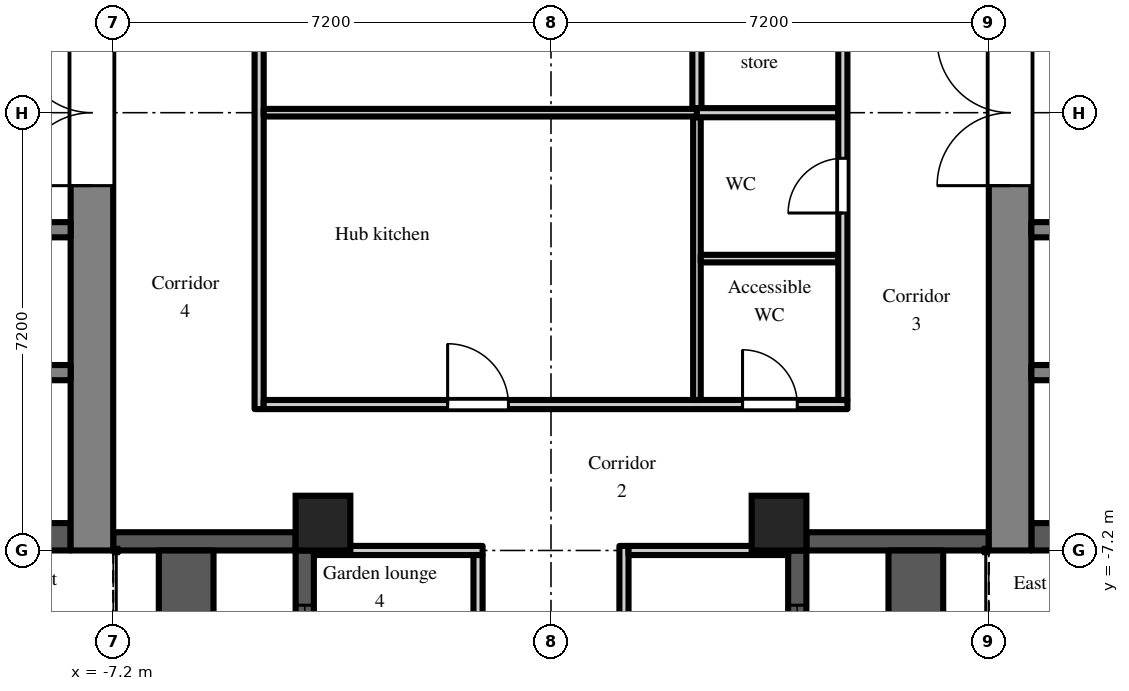
"""IFC4 building model, lengths in metres.
Left out: names, types, materials, properties, quantities, classifications, styles, units other than length and angle.
Written with IfcOpenShell. Run it as: python <this file> out.ifc"""

import sys

from ifc_helpers import new_model, si_unit, direction, frame, frame_2d, origin, origin_2d, place, context, subcontext, project, spatial, rectangle, extrude, element, fill, save


model = new_model("IFC4")
c1 = context("Model", 3, precision=1e-05, world=origin(), true_north=direction((0.0, 1.0)))
c2 = subcontext(c1, "Body", "Model", "MODEL_VIEW")
j1 = project(units=[si_unit("LENGTHUNIT", "METRE"), si_unit("PLANEANGLEUNIT", "RADIAN")], contexts=[c1])
p1 = place(None, origin())
s1 = spatial("IfcSite", under=j1, at=p1, CompositionType="ELEMENT")
p2 = place(p1, origin())
s2 = spatial("IfcBuilding", under=s1, at=p2, CompositionType="ELEMENT")
p3 = place(p2, frame((0.0, 0.0, 129.3)))
s3 = spatial("IfcBuildingStorey", under=s2, at=p3, CompositionType="ELEMENT", Elevation=129.3)
for number, where, z_axis, x_axis in (
    (1, (-3.75, -6.75, 0.0), (0.0, 0.0, 1.0), (1.0, 0.0, 0.0)),
    (2, (3.75, -6.75, 0.0), (0.0, 0.0, 1.0), (1.0, 0.0, 0.0)),
):
    element("IfcColumn", number, at=place(p3, frame(where, z_axis=z_axis, x_axis=x_axis)), inside=s3, PredefinedType="COLUMN", context=c2, shape_type="SweptSolid", body=[
        extrude(rectangle(XDim=0.9, YDim=0.9, at=origin_2d()), origin(), (0.0, 0.0, 1.0), 3.0),
    ])
p4 = place(p3, frame((-7.2, -7.05, 0.0), z_axis=(0.0, 0.0, 1.0), x_axis=(1.0, 0.0, 0.0)))
e3 = element("IfcWall", 3, at=p4, inside=s3, PredefinedType="SOLIDWALL", context=c2, shape_type="SweptSolid", body=[
    extrude(rectangle(XDim=3.0, YDim=0.3, at=frame_2d((1.5, 0.0))), origin(), (0.0, 0.0, 1.0), 2.2),
])
p5 = place(p3, frame((-4.05, -7.2, 0.0), z_axis=(0.0, 0.0, 1.0), x_axis=(0.0, -1.0, 0.0)))
e4 = element("IfcWall", 4, at=p5, inside=s3, PredefinedType="SOLIDWALL", context=c2, shape_type="SweptSolid", body=[
    extrude(rectangle(XDim=7.2, YDim=0.3, at=frame_2d((3.6, 0.0))), origin(), (0.0, 0.0, 1.0), 2.2),
])
p6 = place(p5, frame((3.0, 0.0, 0.0)))
e5 = element("IfcOpeningElement", 5, at=p6, cuts=e4, PredefinedType="OPENING", context=c2, shape_type="SweptSolid", body=[
    extrude(rectangle(XDim=1.2, YDim=2.05, at=frame_2d((0.6, 1.025))), frame((0.0, 0.16, 0.0), z_axis=(0.0, -1.0, 0.0), x_axis=(1.0, 0.0, 0.0)), (0.0, 0.0, 1.0), 0.32),
])
p7 = place(p5, frame((0.9, 0.0, 0.2)))
e6 = element("IfcOpeningElement", 6, at=p7, cuts=e4, PredefinedType="OPENING", context=c2, shape_type="SweptSolid", body=[
    extrude(rectangle(XDim=1.8, YDim=1.85, at=frame_2d((0.9, 0.925))), frame((0.0, 0.16, 0.0), z_axis=(0.0, -1.0, 0.0), x_axis=(1.0, 0.0, 0.0)), (0.0, 0.0, 1.0), 0.32),
])
p8 = place(p5, frame((4.5, 0.0, 0.2)))
e7 = element("IfcOpeningElement", 7, at=p8, cuts=e4, PredefinedType="OPENING", context=c2, shape_type="SweptSolid", body=[
    extrude(rectangle(XDim=1.8, YDim=1.85, at=frame_2d((0.9, 0.925))), frame((0.0, 0.16, 0.0), z_axis=(0.0, -1.0, 0.0), x_axis=(1.0, 0.0, 0.0)), (0.0, 0.0, 1.0), 0.32),
])
p9 = place(p3, frame((4.05, -14.4, 0.0), z_axis=(0.0, 0.0, 1.0), x_axis=(0.0, 1.0, 0.0)))
e8 = element("IfcWall", 8, at=p9, inside=s3, PredefinedType="SOLIDWALL", context=c2, shape_type="SweptSolid", body=[
    extrude(rectangle(XDim=7.2, YDim=0.3, at=frame_2d((3.6, 0.0))), origin(), (0.0, 0.0, 1.0), 2.2),
])
p10 = place(p9, frame((3.0, 0.0, 0.0)))
e9 = element("IfcOpeningElement", 9, at=p10, cuts=e8, PredefinedType="OPENING", context=c2, shape_type="SweptSolid", body=[
    extrude(rectangle(XDim=1.2, YDim=2.05, at=frame_2d((0.6, 1.025))), frame((0.0, 0.16, 0.0), z_axis=(0.0, -1.0, 0.0), x_axis=(1.0, 0.0, 0.0)), (0.0, 0.0, 1.0), 0.32),
])
p11 = place(p9, frame((0.9, 0.0, 0.2)))
e10 = element("IfcOpeningElement", 10, at=p11, cuts=e8, PredefinedType="OPENING", context=c2, shape_type="SweptSolid", body=[
    extrude(rectangle(XDim=1.8, YDim=1.85, at=frame_2d((0.9, 0.925))), frame((0.0, 0.16, 0.0), z_axis=(0.0, -1.0, 0.0), x_axis=(1.0, 0.0, 0.0)), (0.0, 0.0, 1.0), 0.32),
])
p12 = place(p9, frame((4.5, 0.0, 0.2)))
e11 = element("IfcOpeningElement", 11, at=p12, cuts=e8, PredefinedType="OPENING", context=c2, shape_type="SweptSolid", body=[
    extrude(rectangle(XDim=1.8, YDim=1.85, at=frame_2d((0.9, 0.925))), frame((0.0, 0.16, 0.0), z_axis=(0.0, -1.0, 0.0), x_axis=(1.0, 0.0, 0.0)), (0.0, 0.0, 1.0), 0.32),
])
p13 = place(p3, frame((4.2, -7.05, 0.0), z_axis=(0.0, 0.0, 1.0), x_axis=(1.0, 0.0, 0.0)))
e12 = element("IfcWall", 12, at=p13, inside=s3, PredefinedType="SOLIDWALL", context=c2, shape_type="SweptSolid", body=[
    extrude(rectangle(XDim=3.0, YDim=0.3, at=frame_2d((1.5, 0.0))), origin(), (0.0, 0.0, 1.0), 2.2),
])
for number, where, z_axis, x_axis in (
    (13, (6.0, -14.4, 0.0), (0.0, 0.0, 1.0), (0.0, 1.0, 0.0)),
    (14, (-6.0, -14.4, 0.0), (0.0, 0.0, 1.0), (0.0, 1.0, 0.0)),
):
    element("IfcWall", number, at=place(p3, frame(where, z_axis=z_axis, x_axis=x_axis)), inside=s3, PredefinedType="PARAPET", context=c2, shape_type="SweptSolid", body=[
        extrude(rectangle(XDim=7.2, YDim=0.9, at=frame_2d((3.6, 0.0))), origin(), (0.0, 0.0, 1.0), 0.8),
    ])
p14 = place(p3, frame((7.55, -7.2, 0.0), z_axis=(0.0, 0.0, 1.0), x_axis=(0.0, 1.0, 0.0)))
e15 = element("IfcWall", 15, at=p14, inside=s3, PredefinedType="SHEAR", context=c2, shape_type="SweptSolid", body=[
    extrude(rectangle(XDim=14.4, YDim=0.7, at=frame_2d((7.2, 0.0))), origin(), (0.0, 0.0, 1.0), 2.6),
])
p15 = place(p14, frame((6.0, 0.0, 0.0)))
e16 = element("IfcOpeningElement", 16, at=p15, cuts=e15, PredefinedType="OPENING", context=c2, shape_type="SweptSolid", body=[
    extrude(rectangle(XDim=2.4, YDim=2.2, at=frame_2d((1.2, 1.1))), frame((0.0, 0.36, 0.0), z_axis=(0.0, -1.0, 0.0), x_axis=(1.0, 0.0, 0.0)), (0.0, 0.0, 1.0), 0.72),
])
p16 = place(p3, frame((7.9, -6.975, 0.0), z_axis=(0.0, 0.0, 1.0), x_axis=(1.0, 0.0, 0.0)))
e17 = element("IfcWall", 17, at=p16, inside=s3, PredefinedType="SHEAR", context=c2, shape_type="SweptSolid", body=[
    extrude(rectangle(XDim=12.95, YDim=0.45, at=frame_2d((6.475, 0.0))), origin(), (0.0, 0.0, 1.0), 2.6),
])
p17 = place(p3, frame((7.9, -1.925, 0.0), z_axis=(0.0, 0.0, 1.0), x_axis=(1.0, 0.0, 0.0)))
e18 = element("IfcWall", 18, at=p17, inside=s3, PredefinedType="SHEAR", context=c2, shape_type="SweptSolid", body=[
    extrude(rectangle(XDim=12.95, YDim=0.25, at=frame_2d((6.475, 0.0))), origin(), (0.0, 0.0, 1.0), 2.6),
])
p18 = place(p17, frame((0.525, 0.0, 0.0)))
e19 = element("IfcOpeningElement", 19, at=p18, cuts=e18, PredefinedType="OPENING", context=c2, shape_type="SweptSolid", body=[
    extrude(rectangle(XDim=0.9, YDim=2.1, at=frame_2d((0.45, 1.05))), frame((0.0, 0.135, 0.0), z_axis=(0.0, -1.0, 0.0), x_axis=(1.0, 0.0, 0.0)), (0.0, 0.0, 1.0), 0.27),
])
p19 = place(p17, frame((2.625, 0.0, 0.0)))
e20 = element("IfcOpeningElement", 20, at=p19, cuts=e18, PredefinedType="OPENING", context=c2, shape_type="SweptSolid", body=[
    extrude(rectangle(XDim=1.1, YDim=2.1, at=frame_2d((0.55, 1.05))), frame((0.0, 0.135, 0.0), z_axis=(0.0, -1.0, 0.0), x_axis=(1.0, 0.0, 0.0)), (0.0, 0.0, 1.0), 0.27),
])
p20 = place(p17, frame((8.225, 0.0, 0.0)))
e21 = element("IfcOpeningElement", 21, at=p20, cuts=e18, PredefinedType="OPENING", context=c2, shape_type="SweptSolid", body=[
    extrude(rectangle(XDim=0.9, YDim=2.1, at=frame_2d((0.45, 1.05))), frame((0.0, 0.135, 0.0), z_axis=(0.0, -1.0, 0.0), x_axis=(1.0, 0.0, 0.0)), (0.0, 0.0, 1.0), 0.27),
])
p21 = place(p3, frame((7.9, -4.275, 0.0), z_axis=(0.0, 0.0, 1.0), x_axis=(1.0, 0.0, 0.0)))
e22 = element("IfcWall", 22, at=p21, inside=s3, PredefinedType="SHEAR", context=c2, shape_type="SweptSolid", body=[
    extrude(rectangle(XDim=1.95, YDim=0.25, at=frame_2d((0.975, 0.0))), origin(), (0.0, 0.0, 1.0), 2.6),
])
p22 = place(p3, frame((-7.55, -7.2, 0.0), z_axis=(0.0, 0.0, 1.0), x_axis=(0.0, 1.0, 0.0)))
e23 = element("IfcWall", 23, at=p22, inside=s3, PredefinedType="SHEAR", context=c2, shape_type="SweptSolid", body=[
    extrude(rectangle(XDim=14.4, YDim=0.7, at=frame_2d((7.2, 0.0))), origin(), (0.0, 0.0, 1.0), 2.6),
])
p23 = place(p22, frame((6.0, 0.0, 0.0)))
e24 = element("IfcOpeningElement", 24, at=p23, cuts=e23, PredefinedType="OPENING", context=c2, shape_type="SweptSolid", body=[
    extrude(rectangle(XDim=2.4, YDim=2.2, at=frame_2d((1.2, 1.1))), frame((0.0, 0.36, 0.0), z_axis=(0.0, -1.0, 0.0), x_axis=(1.0, 0.0, 0.0)), (0.0, 0.0, 1.0), 0.72),
])
p24 = place(p3, frame((-7.9, -6.975, 0.0), z_axis=(0.0, 0.0, 1.0), x_axis=(-1.0, 0.0, 0.0)))
e25 = element("IfcWall", 25, at=p24, inside=s3, PredefinedType="SHEAR", context=c2, shape_type="SweptSolid", body=[
    extrude(rectangle(XDim=12.95, YDim=0.45, at=frame_2d((6.475, 0.0))), origin(), (0.0, 0.0, 1.0), 2.6),
])
p25 = place(p3, frame((-7.9, -1.925, 0.0), z_axis=(0.0, 0.0, 1.0), x_axis=(-1.0, 0.0, 0.0)))
e26 = element("IfcWall", 26, at=p25, inside=s3, PredefinedType="SHEAR", context=c2, shape_type="SweptSolid", body=[
    extrude(rectangle(XDim=12.95, YDim=0.25, at=frame_2d((6.475, 0.0))), origin(), (0.0, 0.0, 1.0), 2.6),
])
p26 = place(p25, frame((0.525, 0.0, 0.0)))
e27 = element("IfcOpeningElement", 27, at=p26, cuts=e26, PredefinedType="OPENING", context=c2, shape_type="SweptSolid", body=[
    extrude(rectangle(XDim=0.9, YDim=2.1, at=frame_2d((0.45, 1.05))), frame((0.0, 0.135, 0.0), z_axis=(0.0, -1.0, 0.0), x_axis=(1.0, 0.0, 0.0)), (0.0, 0.0, 1.0), 0.27),
])
p27 = place(p25, frame((2.625, 0.0, 0.0)))
e28 = element("IfcOpeningElement", 28, at=p27, cuts=e26, PredefinedType="OPENING", context=c2, shape_type="SweptSolid", body=[
    extrude(rectangle(XDim=1.1, YDim=2.1, at=frame_2d((0.55, 1.05))), frame((0.0, 0.135, 0.0), z_axis=(0.0, -1.0, 0.0), x_axis=(1.0, 0.0, 0.0)), (0.0, 0.0, 1.0), 0.27),
])
p28 = place(p25, frame((8.225, 0.0, 0.0)))
e29 = element("IfcOpeningElement", 29, at=p28, cuts=e26, PredefinedType="OPENING", context=c2, shape_type="SweptSolid", body=[
    extrude(rectangle(XDim=0.9, YDim=2.1, at=frame_2d((0.45, 1.05))), frame((0.0, 0.135, 0.0), z_axis=(0.0, -1.0, 0.0), x_axis=(1.0, 0.0, 0.0)), (0.0, 0.0, 1.0), 0.27),
])
p29 = place(p3, frame((-7.9, -4.275, 0.0), z_axis=(0.0, 0.0, 1.0), x_axis=(-1.0, 0.0, 0.0)))
e30 = element("IfcWall", 30, at=p29, inside=s3, PredefinedType="SHEAR", context=c2, shape_type="SweptSolid", body=[
    extrude(rectangle(XDim=1.95, YDim=0.25, at=frame_2d((0.975, 0.0))), origin(), (0.0, 0.0, 1.0), 2.6),
])
p30 = place(p3, frame((-4.8, -4.875, 0.0), z_axis=(0.0, 0.0, 1.0), x_axis=(0.0, 1.0, 0.0)))
e31 = element("IfcWall", 31, at=p30, inside=s3, PredefinedType="PARTITIONING", context=c2, shape_type="SweptSolid", body=[
    extrude(rectangle(XDim=9.75, YDim=0.15, at=frame_2d((4.875, 0.0))), origin(), (0.0, 0.0, 1.0), 2.6),
])
p31 = place(p3, frame((-4.725, -4.8, 0.0), z_axis=(0.0, 0.0, 1.0), x_axis=(1.0, 0.0, 0.0)))
e32 = element("IfcWall", 32, at=p31, inside=s3, PredefinedType="PARTITIONING", context=c2, shape_type="SweptSolid", body=[
    extrude(rectangle(XDim=9.6, YDim=0.15, at=frame_2d((4.8, 0.0))), origin(), (0.0, 0.0, 1.0), 2.6),
])
p32 = place(p31, frame((7.875, 0.0, 0.0)))
e33 = element("IfcOpeningElement", 33, at=p32, cuts=e32, PredefinedType="OPENING", context=c2, shape_type="SweptSolid", body=[
    extrude(rectangle(XDim=0.9, YDim=2.1, at=frame_2d((0.45, 1.05))), frame((0.0, 0.085, 0.0), z_axis=(0.0, -1.0, 0.0), x_axis=(1.0, 0.0, 0.0)), (0.0, 0.0, 1.0), 0.17),
])
p33 = place(p31, frame((3.025, 0.0, 0.0)))
e34 = element("IfcOpeningElement", 34, at=p33, cuts=e32, PredefinedType="OPENING", context=c2, shape_type="SweptSolid", body=[
    extrude(rectangle(XDim=1.0, YDim=2.1, at=frame_2d((0.5, 1.05))), frame((0.0, 0.085, 0.0), z_axis=(0.0, -1.0, 0.0), x_axis=(1.0, 0.0, 0.0)), (0.0, 0.0, 1.0), 0.17),
])
p34 = place(p3, frame((-4.725, 0.0, 0.0), z_axis=(0.0, 0.0, 1.0), x_axis=(1.0, 0.0, 0.0)))
e35 = element("IfcWall", 35, at=p34, inside=s3, PredefinedType="PARTITIONING", context=c2, shape_type="SweptSolid", body=[
    extrude(rectangle(XDim=7.125, YDim=0.125, at=frame_2d((3.562, 0.0))), origin(), (0.0, 0.0, 1.0), 2.6),
])
p35 = place(p3, frame((-3.9, -7.2, 0.0), z_axis=(0.0, 0.0, 1.0), x_axis=(1.0, 0.0, 0.0)))
e36 = element("IfcWall", 36, at=p35, inside=s3, PredefinedType="PARTITIONING", context=c2, shape_type="SweptSolid", body=[
    extrude(rectangle(XDim=2.775, YDim=0.15, at=frame_2d((1.387, 0.0))), origin(), (0.0, 0.0, 1.0), 2.6),
])
p36 = place(p3, frame((-1.2, -17.925, 0.0), z_axis=(0.0, 0.0, 1.0), x_axis=(0.0, 1.0, 0.0)))
e37 = element("IfcWall", 37, at=p36, inside=s3, PredefinedType="PARTITIONING", context=c2, shape_type="SweptSolid", body=[
    extrude(rectangle(XDim=10.65, YDim=0.15, at=frame_2d((5.325, 0.0))), origin(), (0.0, 0.0, 1.0), 2.6),
])
p37 = place(p36, frame((8.475, 0.0, 0.0)))
e38 = element("IfcOpeningElement", 38, at=p37, cuts=e37, PredefinedType="OPENING", context=c2, shape_type="SweptSolid", body=[
    extrude(rectangle(XDim=0.9, YDim=2.1, at=frame_2d((0.45, 1.05))), frame((0.0, 0.085, 0.0), z_axis=(0.0, -1.0, 0.0), x_axis=(1.0, 0.0, 0.0)), (0.0, 0.0, 1.0), 0.17),
])
p38 = place(p36, frame((2.325, 0.0, 0.0)))
e39 = element("IfcOpeningElement", 39, at=p38, cuts=e37, PredefinedType="OPENING", context=c2, shape_type="SweptSolid", body=[
    extrude(rectangle(XDim=1.0, YDim=2.1, at=frame_2d((0.5, 1.05))), frame((0.0, 0.085, 0.0), z_axis=(0.0, -1.0, 0.0), x_axis=(1.0, 0.0, 0.0)), (0.0, 0.0, 1.0), 0.17),
])
p39 = place(p3, frame((1.2, -17.925, 0.0), z_axis=(0.0, 0.0, 1.0), x_axis=(0.0, 1.0, 0.0)))
e40 = element("IfcWall", 40, at=p39, inside=s3, PredefinedType="PARTITIONING", context=c2, shape_type="SweptSolid", body=[
    extrude(rectangle(XDim=10.8, YDim=0.15, at=frame_2d((5.4, 0.0))), origin(), (0.0, 0.0, 1.0), 2.6),
])
p40 = place(p39, frame((4.875, 0.0, 0.0)))
e41 = element("IfcOpeningElement", 41, at=p40, cuts=e40, PredefinedType="OPENING", context=c2, shape_type="SweptSolid", body=[
    extrude(rectangle(XDim=0.9, YDim=2.1, at=frame_2d((0.45, 1.05))), frame((0.0, 0.085, 0.0), z_axis=(0.0, -1.0, 0.0), x_axis=(1.0, 0.0, 0.0)), (0.0, 0.0, 1.0), 0.17),
])
p41 = place(p39, frame((1.925, 0.0, 0.0)))
e42 = element("IfcOpeningElement", 42, at=p41, cuts=e40, PredefinedType="OPENING", context=c2, shape_type="SweptSolid", body=[
    extrude(rectangle(XDim=1.0, YDim=2.1, at=frame_2d((0.5, 1.05))), frame((0.0, 0.085, 0.0), z_axis=(0.0, -1.0, 0.0), x_axis=(1.0, 0.0, 0.0)), (0.0, 0.0, 1.0), 0.17),
])
p42 = place(p3, frame((1.275, -7.2, 0.0), z_axis=(0.0, 0.0, 1.0), x_axis=(1.0, 0.0, 0.0)))
e43 = element("IfcWall", 43, at=p42, inside=s3, PredefinedType="PARTITIONING", context=c2, shape_type="SweptSolid", body=[
    extrude(rectangle(XDim=2.625, YDim=0.15, at=frame_2d((1.312, 0.0))), origin(), (0.0, 0.0, 1.0), 2.6),
])
p43 = place(p3, frame((2.4, -4.725, 0.0), z_axis=(0.0, 0.0, 1.0), x_axis=(0.0, 1.0, 0.0)))
e44 = element("IfcWall", 44, at=p43, inside=s3, PredefinedType="PARTITIONING", context=c2, shape_type="SweptSolid", body=[
    extrude(rectangle(XDim=4.65, YDim=0.125, at=frame_2d((2.325, 0.0))), origin(), (0.0, 0.0, 1.0), 2.6),
])
p44 = place(p3, frame((2.462, -2.4, 0.0), z_axis=(0.0, 0.0, 1.0), x_axis=(1.0, 0.0, 0.0)))
e45 = element("IfcWall", 45, at=p44, inside=s3, PredefinedType="PARTITIONING", context=c2, shape_type="SweptSolid", body=[
    extrude(rectangle(XDim=2.263, YDim=0.125, at=frame_2d((1.131, 0.0))), origin(), (0.0, 0.0, 1.0), 2.6),
])
p45 = place(p3, frame((2.4, 0.075, 0.0), z_axis=(0.0, 0.0, 1.0), x_axis=(0.0, 1.0, 0.0)))
e46 = element("IfcWall", 46, at=p45, inside=s3, PredefinedType="PARTITIONING", context=c2, shape_type="SweptSolid", body=[
    extrude(rectangle(XDim=4.65, YDim=0.15, at=frame_2d((2.325, 0.0))), origin(), (0.0, 0.0, 1.0), 2.6),
])
p46 = place(p3, frame((2.4, 0.0, 0.0), z_axis=(0.0, 0.0, 1.0), x_axis=(1.0, 0.0, 0.0)))
e47 = element("IfcWall", 47, at=p46, inside=s3, PredefinedType="PARTITIONING", context=c2, shape_type="SweptSolid", body=[
    extrude(rectangle(XDim=2.325, YDim=0.15, at=frame_2d((1.163, 0.0))), origin(), (0.0, 0.0, 1.0), 2.6),
])
p47 = place(p3, frame((4.8, -4.725, 0.0), z_axis=(0.0, 0.0, 1.0), x_axis=(0.0, 1.0, 0.0)))
e48 = element("IfcWall", 48, at=p47, inside=s3, PredefinedType="PARTITIONING", context=c2, shape_type="SweptSolid", body=[
    extrude(rectangle(XDim=9.45, YDim=0.15, at=frame_2d((4.725, 0.0))), origin(), (0.0, 0.0, 1.0), 2.6),
])
p48 = place(p47, frame((3.075, 0.0, 0.0)))
e49 = element("IfcOpeningElement", 49, at=p48, cuts=e48, PredefinedType="OPENING", context=c2, shape_type="SweptSolid", body=[
    extrude(rectangle(XDim=0.9, YDim=2.1, at=frame_2d((0.45, 1.05))), frame((0.0, 0.085, 0.0), z_axis=(0.0, -1.0, 0.0), x_axis=(1.0, 0.0, 0.0)), (0.0, 0.0, 1.0), 0.17),
])
p49 = place(p47, frame((6.675, 0.0, 0.0)))
e50 = element("IfcOpeningElement", 50, at=p49, cuts=e48, PredefinedType="OPENING", context=c2, shape_type="SweptSolid", body=[
    extrude(rectangle(XDim=0.9, YDim=2.1, at=frame_2d((0.45, 1.05))), frame((0.0, 0.085, 0.0), z_axis=(0.0, -1.0, 0.0), x_axis=(1.0, 0.0, 0.0)), (0.0, 0.0, 1.0), 0.17),
])
p50 = place(p7, origin())
e51 = element("IfcWindow", 51, at=p50, inside=s3, PartitioningType="SINGLE_PANEL", PredefinedType="WINDOW", context=c2, shape_type="SweptSolid", body=[
    extrude(rectangle(XDim=1.8, YDim=1.85, at=frame_2d((0.9, 0.925))), frame((0.0, 0.03, 0.0), z_axis=(0.0, -1.0, 0.0), x_axis=(1.0, 0.0, 0.0)), (0.0, 0.0, 1.0), 0.06),
])
fill(e6, e51)
p51 = place(p12, origin())
e52 = element("IfcWindow", 52, at=p51, inside=s3, PartitioningType="SINGLE_PANEL", PredefinedType="WINDOW", context=c2, shape_type="SweptSolid", body=[
    extrude(rectangle(XDim=1.8, YDim=1.85, at=frame_2d((0.9, 0.925))), frame((0.0, 0.03, 0.0), z_axis=(0.0, -1.0, 0.0), x_axis=(1.0, 0.0, 0.0)), (0.0, 0.0, 1.0), 0.06),
])
fill(e11, e52)
p52 = place(p15, origin())
e53 = element("IfcDoor", 53, at=p52, inside=s3, OperationType="DOUBLE_DOOR_DOUBLE_SWING", PredefinedType="DOOR", context=c2, shape_type="SweptSolid", body=[
    extrude(rectangle(XDim=2.4, YDim=2.2, at=frame_2d((1.2, 1.1))), frame((0.0, 0.025, 0.0), z_axis=(0.0, -1.0, 0.0), x_axis=(1.0, 0.0, 0.0)), (0.0, 0.0, 1.0), 0.05),
])
fill(e16, e53)
p53 = place(p23, origin())
e54 = element("IfcDoor", 54, at=p53, inside=s3, OperationType="DOUBLE_DOOR_DOUBLE_SWING", PredefinedType="DOOR", context=c2, shape_type="SweptSolid", body=[
    extrude(rectangle(XDim=2.4, YDim=2.2, at=frame_2d((1.2, 1.1))), frame((0.0, 0.025, 0.0), z_axis=(0.0, -1.0, 0.0), x_axis=(1.0, 0.0, 0.0)), (0.0, 0.0, 1.0), 0.05),
])
fill(e24, e54)
p54 = place(p32, origin())
e55 = element("IfcDoor", 55, at=p54, inside=s3, OperationType="SINGLE_SWING_LEFT", PredefinedType="DOOR", context=c2, shape_type="SweptSolid", body=[
    extrude(rectangle(XDim=0.9, YDim=2.1, at=frame_2d((0.45, 1.05))), frame((0.0, 0.025, 0.0), z_axis=(0.0, -1.0, 0.0), x_axis=(1.0, 0.0, 0.0)), (0.0, 0.0, 1.0), 0.05),
])
fill(e33, e55)
p55 = place(p48, origin())
e56 = element("IfcDoor", 56, at=p55, inside=s3, OperationType="SINGLE_SWING_LEFT", PredefinedType="DOOR", context=c2, shape_type="SweptSolid", body=[
    extrude(rectangle(XDim=0.9, YDim=2.1, at=frame_2d((0.45, 1.05))), frame((0.0, 0.025, 0.0), z_axis=(0.0, -1.0, 0.0), x_axis=(1.0, 0.0, 0.0)), (0.0, 0.0, 1.0), 0.05),
])
fill(e49, e56)
p56 = place(p33, origin())
e57 = element("IfcDoor", 57, at=p56, inside=s3, OperationType="SINGLE_SWING_LEFT", PredefinedType="DOOR", context=c2, shape_type="SweptSolid", body=[
    extrude(rectangle(XDim=1.0, YDim=2.1, at=frame_2d((0.5, 1.05))), frame((0.0, 0.025, 0.0), z_axis=(0.0, -1.0, 0.0), x_axis=(1.0, 0.0, 0.0)), (0.0, 0.0, 1.0), 0.05),
])
fill(e34, e57)
save(model, sys.argv[1])
